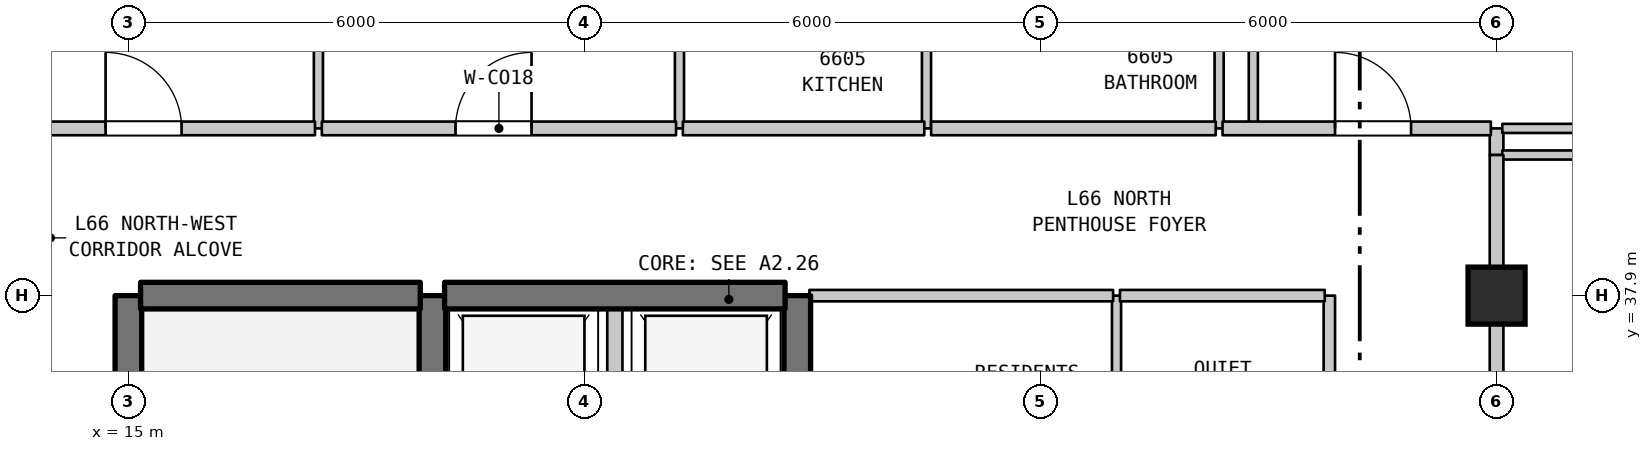
"""IFC4 building model, lengths in metres.
Left out: names, types, materials, properties, quantities, classifications, styles, units other than length and angle.
Written with IfcOpenShell. Run it as: python <this file> out.ifc"""

import sys

from ifc_helpers import new_model, si_unit, direction, frame, frame_2d, origin, origin_2d, place, context, subcontext, project, spatial, rectangle, extrude, element, fill, save


model = new_model("IFC4")
c1 = context("Model", 3, precision=1e-05, world=origin(), true_north=direction((0.0, 1.0)))
c2 = subcontext(c1, "Body", "Model", "MODEL_VIEW")
j1 = project(units=[si_unit("LENGTHUNIT", "METRE"), si_unit("PLANEANGLEUNIT", "RADIAN")], contexts=[c1])
p1 = place(None, origin())
s1 = spatial("IfcSite", under=j1, at=p1, CompositionType="ELEMENT")
p2 = place(p1, origin())
s2 = spatial("IfcBuilding", under=s1, at=p2, CompositionType="ELEMENT")
p3 = place(p2, frame((0.0, 0.0, 265.8)))
s3 = spatial("IfcBuildingStorey", under=s2, at=p3, CompositionType="ELEMENT", Elevation=265.8)
p4 = place(p3, frame((33.0, 37.9, 0.0), z_axis=(0.0, 0.0, 1.0), x_axis=(1.0, 0.0, 0.0)))
e1 = element("IfcColumn", 1, at=p4, inside=s3, PredefinedType="COLUMN", context=c2, shape_type="SweptSolid", body=[
    extrude(rectangle(XDim=0.75, YDim=0.75, at=origin_2d()), origin(), (0.0, 0.0, 1.0), 3.7),
])
p5 = place(p3, frame((15.0, 31.1, 0.0), z_axis=(0.0, 0.0, 1.0), x_axis=(0.0, 1.0, 0.0)))
e2 = element("IfcWall", 2, at=p5, inside=s3, PredefinedType="SHEAR", context=c2, shape_type="SweptSolid", body=[
    extrude(rectangle(XDim=6.8, YDim=0.35, at=frame_2d((3.4, 0.0))), origin(), (0.0, 0.0, 1.0), 3.39),
])
p6 = place(p3, frame((17.5, 40.1, 0.0), z_axis=(0.0, 0.0, 1.0), x_axis=(0.0, 1.0, 0.0)))
e3 = element("IfcWall", 3, at=p6, inside=s3, PredefinedType="PARTITIONING", context=c2, shape_type="SweptSolid", body=[
    extrude(rectangle(XDim=13.79, YDim=0.12, at=frame_2d((6.895, 0.0))), origin(), (0.0, 0.0, 1.0), 3.39),
])
p7 = place(p3, frame((19.0, 35.0, 0.0), z_axis=(0.0, 0.0, 1.0), x_axis=(0.0, 1.0, 0.0)))
e4 = element("IfcWall", 4, at=p7, inside=s3, PredefinedType="SHEAR", context=c2, shape_type="SweptSolid", body=[
    extrude(rectangle(XDim=2.9, YDim=0.35, at=frame_2d((1.45, 0.0))), origin(), (0.0, 0.0, 1.0), 3.39),
])
p8 = place(p3, frame((21.4, 35.0, 0.0), z_axis=(0.0, 0.0, 1.0), x_axis=(0.0, 1.0, 0.0)))
e5 = element("IfcWall", 5, at=p8, inside=s3, PredefinedType="STANDARD", context=c2, shape_type="SweptSolid", body=[
    extrude(rectangle(XDim=2.9, YDim=0.2, at=frame_2d((1.45, 0.0))), origin(), (0.0, 0.0, 1.0), 3.39),
])
p9 = place(p3, frame((22.25, 40.1, 0.0), z_axis=(0.0, 0.0, 1.0), x_axis=(0.0, 1.0, 0.0)))
e6 = element("IfcWall", 6, at=p9, inside=s3, PredefinedType="PARTITIONING", context=c2, shape_type="SweptSolid", body=[
    extrude(rectangle(XDim=2.3, YDim=0.12, at=frame_2d((1.15, 0.0))), origin(), (0.0, 0.0, 1.0), 3.39),
])
p10 = place(p3, frame((23.8, 35.0, 0.0), z_axis=(0.0, 0.0, 1.0), x_axis=(0.0, 1.0, 0.0)))
e7 = element("IfcWall", 7, at=p10, inside=s3, PredefinedType="SHEAR", context=c2, shape_type="SweptSolid", body=[
    extrude(rectangle(XDim=2.9, YDim=0.35, at=frame_2d((1.45, 0.0))), origin(), (0.0, 0.0, 1.0), 3.39),
])
p11 = place(p3, frame((25.5, 40.1, 0.0), z_axis=(0.0, 0.0, 1.0), x_axis=(0.0, 1.0, 0.0)))
e8 = element("IfcWall", 8, at=p11, inside=s3, PredefinedType="PARTITIONING", context=c2, shape_type="SweptSolid", body=[
    extrude(rectangle(XDim=2.3, YDim=0.12, at=frame_2d((1.15, 0.0))), origin(), (0.0, 0.0, 1.0), 3.39),
])
p12 = place(p3, frame((28.0, 35.0, 0.0), z_axis=(0.0, 0.0, 1.0), x_axis=(0.0, 1.0, 0.0)))
e9 = element("IfcWall", 9, at=p12, inside=s3, PredefinedType="PARTITIONING", context=c2, shape_type="SweptSolid", body=[
    extrude(rectangle(XDim=2.9, YDim=0.12, at=frame_2d((1.45, 0.0))), origin(), (0.0, 0.0, 1.0), 3.39),
])
p13 = place(p3, frame((29.35, 40.1, 0.0), z_axis=(0.0, 0.0, 1.0), x_axis=(0.0, 1.0, 0.0)))
e10 = element("IfcWall", 10, at=p13, inside=s3, PredefinedType="PARTITIONING", context=c2, shape_type="SweptSolid", body=[
    extrude(rectangle(XDim=2.3, YDim=0.12, at=frame_2d((1.15, 0.0))), origin(), (0.0, 0.0, 1.0), 3.39),
])
p14 = place(p3, frame((29.8, 40.1, 0.0), z_axis=(0.0, 0.0, 1.0), x_axis=(0.0, 1.0, 0.0)))
e11 = element("IfcWall", 11, at=p14, inside=s3, PredefinedType="PARTITIONING", context=c2, shape_type="SweptSolid", body=[
    extrude(rectangle(XDim=13.79, YDim=0.12, at=frame_2d((6.895, 0.0))), origin(), (0.0, 0.0, 1.0), 3.39),
])
p15 = place(p3, frame((30.8, 35.0, 0.0), z_axis=(0.0, 0.0, 1.0), x_axis=(0.0, 1.0, 0.0)))
e12 = element("IfcWall", 12, at=p15, inside=s3, PredefinedType="STANDARD", context=c2, shape_type="SweptSolid", body=[
    extrude(rectangle(XDim=2.9, YDim=0.15, at=frame_2d((1.45, 0.0))), origin(), (0.0, 0.0, 1.0), 3.39),
])
p16 = place(p3, frame((33.0, 36.095, 0.0), z_axis=(0.0, 0.0, 1.0), x_axis=(0.0, 1.0, 0.0)))
e13 = element("IfcWall", 13, at=p16, inside=s3, PredefinedType="STANDARD", context=c2, shape_type="SweptSolid", body=[
    extrude(rectangle(XDim=1.805, YDim=0.18, at=frame_2d((0.902, 0.0))), origin(), (0.0, 0.0, 1.0), 2.89),
])
p17 = place(p3, frame((33.0, 39.75, 0.0), z_axis=(0.0, 0.0, 1.0), x_axis=(0.0, 1.0, 0.0)))
e14 = element("IfcWall", 14, at=p17, inside=s3, PredefinedType="STANDARD", context=c2, shape_type="SweptSolid", body=[
    extrude(rectangle(XDim=0.35, YDim=0.18, at=frame_2d((0.175, 0.0))), origin(), (0.0, 0.0, 1.0), 3.39),
])
p18 = place(p3, frame((15.16, 37.9, 0.0), z_axis=(0.0, 0.0, 1.0), x_axis=(1.0, 0.0, 0.0)))
e15 = element("IfcWall", 15, at=p18, inside=s3, PredefinedType="SHEAR", context=c2, shape_type="SweptSolid", body=[
    extrude(rectangle(XDim=3.68, YDim=0.35, at=frame_2d((1.84, 0.0))), origin(), (0.0, 0.0, 1.0), 3.39),
])
p19 = place(p3, frame((19.16, 37.9, 0.0), z_axis=(0.0, 0.0, 1.0), x_axis=(1.0, 0.0, 0.0)))
e16 = element("IfcWall", 16, at=p19, inside=s3, PredefinedType="SHEAR", context=c2, shape_type="SweptSolid", body=[
    extrude(rectangle(XDim=4.48, YDim=0.35, at=frame_2d((2.24, 0.0))), origin(), (0.0, 0.0, 1.0), 3.39),
])
p20 = place(p3, frame((23.96, 37.9, 0.0), z_axis=(0.0, 0.0, 1.0), x_axis=(1.0, 0.0, 0.0)))
e17 = element("IfcWall", 17, at=p20, inside=s3, PredefinedType="STANDARD", context=c2, shape_type="SweptSolid", body=[
    extrude(rectangle(XDim=3.995, YDim=0.15, at=frame_2d((1.998, 0.0))), origin(), (0.0, 0.0, 1.0), 2.89),
])
p21 = place(p3, frame((28.045, 37.9, 0.0), z_axis=(0.0, 0.0, 1.0), x_axis=(1.0, 0.0, 0.0)))
e18 = element("IfcWall", 18, at=p21, inside=s3, PredefinedType="STANDARD", context=c2, shape_type="SweptSolid", body=[
    extrude(rectangle(XDim=2.695, YDim=0.15, at=frame_2d((1.348, 0.0))), origin(), (0.0, 0.0, 1.0), 2.89),
])
p22 = place(p3, frame((33.075, 39.75, 0.0), z_axis=(0.0, 0.0, 1.0), x_axis=(1.0, 0.0, 0.0)))
e19 = element("IfcWall", 19, at=p22, inside=s3, PredefinedType="PARTITIONING", context=c2, shape_type="SweptSolid", body=[
    extrude(rectangle(XDim=4.46, YDim=0.12, at=frame_2d((2.23, 0.0))), origin(), (0.0, 0.0, 1.0), 3.39),
])
p23 = place(p3, frame((12.975, 40.1, 0.0), z_axis=(0.0, 0.0, 1.0), x_axis=(1.0, 0.0, 0.0)))
e20 = element("IfcWall", 20, at=p23, inside=s3, PredefinedType="STANDARD", context=c2, shape_type="SweptSolid", body=[
    extrude(rectangle(XDim=4.48, YDim=0.18, at=frame_2d((2.24, 0.0))), origin(), (0.0, 0.0, 1.0), 3.39),
])
p24 = place(p23, frame((1.725, 0.0, 0.0)))
e21 = element("IfcOpeningElement", 21, at=p24, cuts=e20, PredefinedType="OPENING", context=c2, shape_type="SweptSolid", body=[
    extrude(rectangle(XDim=1.0, YDim=2.15, at=frame_2d((0.5, 1.075))), frame((0.0, 0.1, 0.0), z_axis=(0.0, -1.0, 0.0), x_axis=(1.0, 0.0, 0.0)), (0.0, 0.0, 1.0), 0.2),
])
p25 = place(p3, frame((17.545, 40.1, 0.0), z_axis=(0.0, 0.0, 1.0), x_axis=(1.0, 0.0, 0.0)))
e22 = element("IfcWall", 22, at=p25, inside=s3, PredefinedType="STANDARD", context=c2, shape_type="SweptSolid", body=[
    extrude(rectangle(XDim=4.66, YDim=0.18, at=frame_2d((2.33, 0.0))), origin(), (0.0, 0.0, 1.0), 3.39),
])
p26 = place(p25, frame((1.759, 0.0, 0.0)))
e23 = element("IfcOpeningElement", 23, at=p26, cuts=e22, PredefinedType="OPENING", context=c2, shape_type="SweptSolid", body=[
    extrude(rectangle(XDim=1.0, YDim=2.15, at=frame_2d((0.5, 1.075))), frame((0.0, 0.1, 0.0), z_axis=(0.0, -1.0, 0.0), x_axis=(1.0, 0.0, 0.0)), (0.0, 0.0, 1.0), 0.2),
])
p27 = place(p3, frame((22.295, 40.1, 0.0), z_axis=(0.0, 0.0, 1.0), x_axis=(1.0, 0.0, 0.0)))
e24 = element("IfcWall", 24, at=p27, inside=s3, PredefinedType="STANDARD", context=c2, shape_type="SweptSolid", body=[
    extrude(rectangle(XDim=3.176, YDim=0.18, at=frame_2d((1.588, 0.0))), origin(), (0.0, 0.0, 1.0), 3.39),
])
p28 = place(p3, frame((25.561, 40.1, 0.0), z_axis=(0.0, 0.0, 1.0), x_axis=(1.0, 0.0, 0.0)))
e25 = element("IfcWall", 25, at=p28, inside=s3, PredefinedType="STANDARD", context=c2, shape_type="SweptSolid", body=[
    extrude(rectangle(XDim=3.744, YDim=0.18, at=frame_2d((1.872, 0.0))), origin(), (0.0, 0.0, 1.0), 3.39),
])
p29 = place(p3, frame((29.395, 40.1, 0.0), z_axis=(0.0, 0.0, 1.0), x_axis=(1.0, 0.0, 0.0)))
e26 = element("IfcWall", 26, at=p29, inside=s3, PredefinedType="STANDARD", context=c2, shape_type="SweptSolid", body=[
    extrude(rectangle(XDim=3.53, YDim=0.18, at=frame_2d((1.765, 0.0))), origin(), (0.0, 0.0, 1.0), 3.39),
])
p30 = place(p29, frame((1.48, 0.0, 0.0)))
e27 = element("IfcOpeningElement", 27, at=p30, cuts=e26, PredefinedType="OPENING", context=c2, shape_type="SweptSolid", body=[
    extrude(rectangle(XDim=1.0, YDim=2.15, at=frame_2d((0.5, 1.075))), frame((0.0, 0.1, 0.0), z_axis=(0.0, -1.0, 0.0), x_axis=(1.0, 0.0, 0.0)), (0.0, 0.0, 1.0), 0.2),
])
p31 = place(p3, frame((33.075, 40.1, 0.0), z_axis=(0.0, 0.0, 1.0), x_axis=(1.0, 0.0, 0.0)))
e28 = element("IfcWall", 28, at=p31, inside=s3, PredefinedType="PARTITIONING", context=c2, shape_type="SweptSolid", body=[
    extrude(rectangle(XDim=1.41, YDim=0.12, at=frame_2d((0.705, 0.0))), origin(), (0.0, 0.0, 1.0), 3.39),
])
p32 = place(p3, frame((33.0, 37.9, 0.0), z_axis=(0.0, 0.0, 1.0), x_axis=(0.0, 1.0, 0.0)))
e29 = element("IfcWall", 29, at=p32, inside=s3, PredefinedType="STANDARD", context=c2, shape_type="SweptSolid", body=[
    extrude(rectangle(XDim=1.85, YDim=0.18, at=frame_2d((0.925, 0.0))), origin(), (0.0, 0.0, 1.0), 2.79),
])
p33 = place(p24, origin())
e30 = element("IfcDoor", 30, at=p33, inside=s3, OperationType="SINGLE_SWING_LEFT", PredefinedType="DOOR", context=c2, shape_type="SweptSolid", body=[
    extrude(rectangle(XDim=1.0, YDim=2.15, at=frame_2d((0.5, 1.075))), frame((0.0, 0.025, 0.0), z_axis=(0.0, -1.0, 0.0), x_axis=(1.0, 0.0, 0.0)), (0.0, 0.0, 1.0), 0.05),
])
fill(e21, e30)
p34 = place(p26, origin())
e31 = element("IfcDoor", 31, at=p34, inside=s3, OperationType="SINGLE_SWING_RIGHT", PredefinedType="DOOR", context=c2, shape_type="SweptSolid", body=[
    extrude(rectangle(XDim=1.0, YDim=2.15, at=frame_2d((0.5, 1.075))), frame((0.0, 0.025, 0.0), z_axis=(0.0, -1.0, 0.0), x_axis=(1.0, 0.0, 0.0)), (0.0, 0.0, 1.0), 0.05),
])
fill(e23, e31)
p35 = place(p30, origin())
e32 = element("IfcDoor", 32, at=p35, inside=s3, OperationType="SINGLE_SWING_LEFT", PredefinedType="DOOR", context=c2, shape_type="SweptSolid", body=[
    extrude(rectangle(XDim=1.0, YDim=2.15, at=frame_2d((0.5, 1.075))), frame((0.0, 0.025, 0.0), z_axis=(0.0, -1.0, 0.0), x_axis=(1.0, 0.0, 0.0)), (0.0, 0.0, 1.0), 0.05),
])
fill(e27, e32)
save(model, sys.argv[1])
